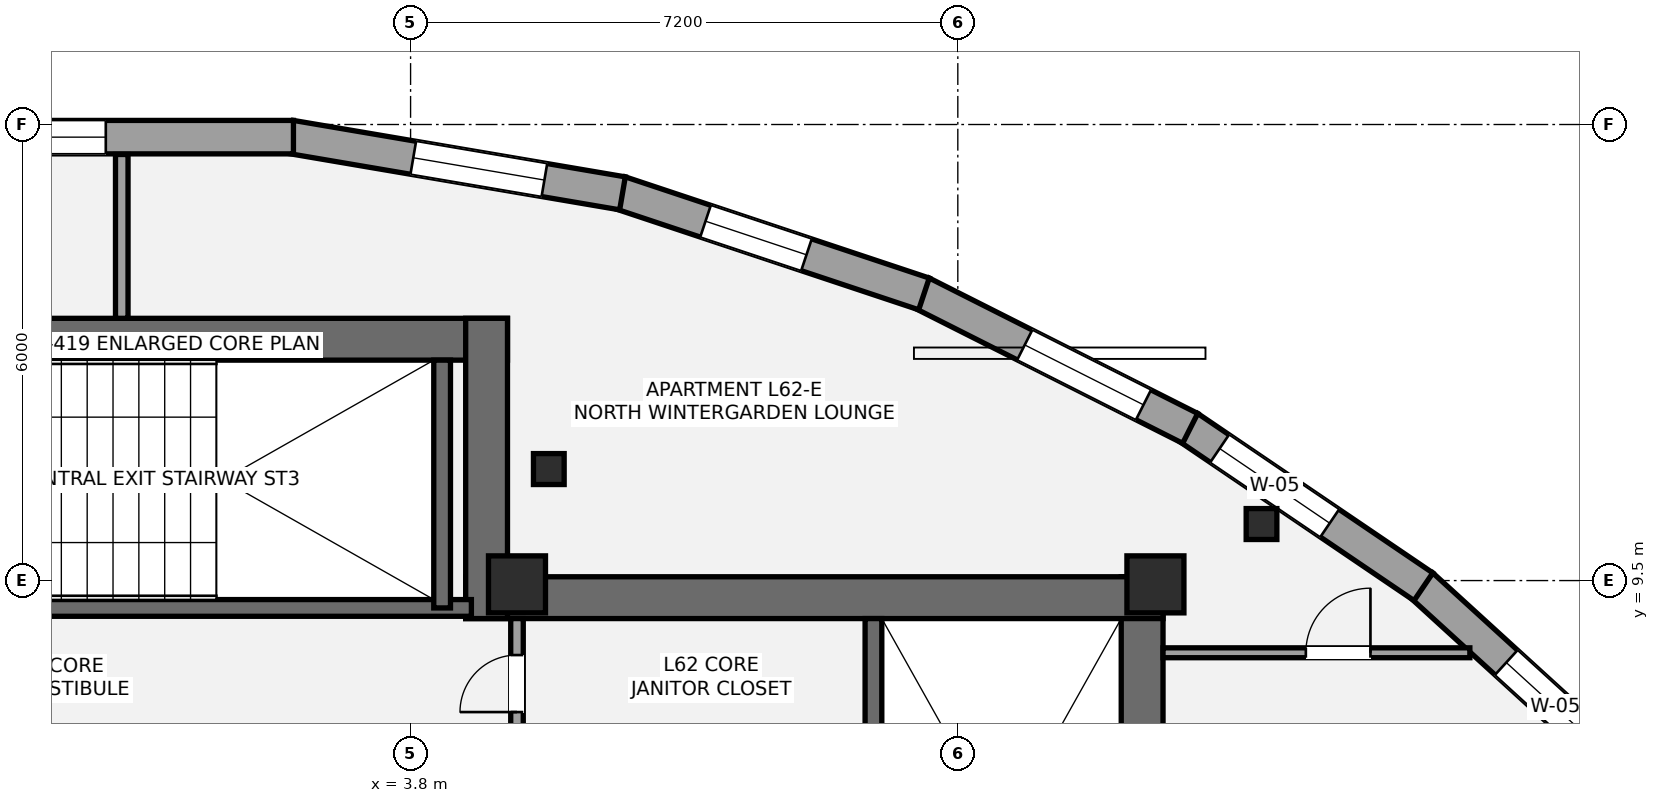
"""IFC4 building model, lengths in metres.
Left out: names, types, materials, properties, quantities, classifications, styles, units other than length and angle.
Written with IfcOpenShell. Run it as: python <this file> out.ifc"""

import sys

from ifc_helpers import new_model, si_unit, direction, frame, frame_2d, origin, origin_2d, place, context, subcontext, project, spatial, rectangle, i_section, extrude, element, fill, save


model = new_model("IFC4")
c1 = context("Model", 3, precision=1e-05, world=origin(), true_north=direction((0.0, 1.0)))
c2 = subcontext(c1, "Body", "Model", "MODEL_VIEW")
j1 = project(units=[si_unit("LENGTHUNIT", "METRE"), si_unit("PLANEANGLEUNIT", "RADIAN")], contexts=[c1])
p1 = place(None, origin())
s1 = spatial("IfcSite", under=j1, at=p1, CompositionType="ELEMENT")
p2 = place(p1, origin())
s2 = spatial("IfcBuilding", under=s1, at=p2, CompositionType="ELEMENT")
p3 = place(p2, frame((0.0, 0.0, 222.6)))
s3 = spatial("IfcBuildingStorey", under=s2, at=p3, CompositionType="ELEMENT", Elevation=222.6)
p4 = place(p3, frame((13.425, 1.3, 0.0), z_axis=(0.0, 0.0, 1.0), x_axis=(0.0, 1.0, 0.0)))
e1 = element("IfcWall", 1, at=p4, inside=s3, PredefinedType="SHEAR", context=c2, shape_type="SweptSolid", body=[
    extrude(rectangle(XDim=8.25, YDim=0.55, at=frame_2d((4.125, 0.0))), origin(), (0.0, 0.0, 1.0), 3.15),
])
p5 = place(p3, frame((4.525, 9.275, 0.0), z_axis=(0.0, 0.0, 1.0), x_axis=(1.0, 0.0, 0.0)))
e2 = element("IfcWall", 2, at=p5, inside=s3, PredefinedType="SHEAR", context=c2, shape_type="SweptSolid", body=[
    extrude(rectangle(XDim=9.175, YDim=0.55, at=frame_2d((4.587, 0.0))), origin(), (0.0, 0.0, 1.0), 3.15),
])
p6 = place(p3, frame((9.89, 1.85, 0.0), z_axis=(0.0, 0.0, 1.0), x_axis=(0.0, 1.0, 0.0)))
e3 = element("IfcWall", 3, at=p6, inside=s3, PredefinedType="SHEAR", context=c2, shape_type="SweptSolid", body=[
    extrude(rectangle(XDim=7.15, YDim=0.22, at=frame_2d((3.575, 0.0))), origin(), (0.0, 0.0, 1.0), 3.15),
])
p7 = place(p3, frame((-5.075, 12.675, 0.0), z_axis=(0.0, 0.0, 1.0), x_axis=(1.0, 0.0, 0.0)))
e4 = element("IfcWall", 4, at=p7, inside=s3, PredefinedType="SHEAR", context=c2, shape_type="SweptSolid", body=[
    extrude(rectangle(XDim=10.15, YDim=0.55, at=frame_2d((5.075, 0.0))), origin(), (0.0, 0.0, 1.0), 3.15),
])
p8 = place(p3, frame((4.8, 9.0, 0.0), z_axis=(0.0, 0.0, 1.0), x_axis=(0.0, 1.0, 0.0)))
e5 = element("IfcWall", 5, at=p8, inside=s3, PredefinedType="SHEAR", context=c2, shape_type="SweptSolid", body=[
    extrude(rectangle(XDim=3.95, YDim=0.55, at=frame_2d((1.975, 0.0))), origin(), (0.0, 0.0, 1.0), 3.15),
])
p9 = place(p3, frame((-4.7, 9.14, 0.0), z_axis=(0.0, 0.0, 1.0), x_axis=(1.0, 0.0, 0.0)))
e6 = element("IfcWall", 6, at=p9, inside=s3, PredefinedType="SHEAR", context=c2, shape_type="SweptSolid", body=[
    extrude(rectangle(XDim=9.3, YDim=0.22, at=frame_2d((4.65, 0.0))), origin(), (0.0, 0.0, 1.0), 3.15),
])
p10 = place(p9, frame((1.15, 0.0, 0.0)))
e7 = element("IfcOpeningElement", 7, at=p10, cuts=e6, PredefinedType="OPENING", context=c2, shape_type="SweptSolid", body=[
    extrude(rectangle(XDim=1.05, YDim=2.15, at=frame_2d((0.525, 1.075))), frame((0.0, 0.12, 0.0), z_axis=(0.0, -1.0, 0.0), x_axis=(1.0, 0.0, 0.0)), (0.0, 0.0, 1.0), 0.24),
])
p11 = place(p3, frame((4.215, 9.14, 0.0), z_axis=(0.0, 0.0, 1.0), x_axis=(0.0, 1.0, 0.0)))
e8 = element("IfcWall", 8, at=p11, inside=s3, PredefinedType="SHEAR", context=c2, shape_type="SweptSolid", body=[
    extrude(rectangle(XDim=3.26, YDim=0.22, at=frame_2d((1.63, 0.0))), origin(), (0.0, 0.0, 1.0), 3.15),
])
for number, where, z_axis, x_axis in (
    (9, (5.2, 9.45, 0.0), (0.0, 0.0, 1.0), (1.0, 0.0, 0.0)),
    (10, (13.6, 9.45, 0.0), (0.0, 0.0, 1.0), (1.0, 0.0, 0.0)),
):
    element("IfcColumn", number, at=place(p3, frame(where, z_axis=z_axis, x_axis=x_axis)), inside=s3, PredefinedType="PILASTER", context=c2, shape_type="SweptSolid", body=[
        extrude(rectangle(XDim=0.75, YDim=0.75, at=origin_2d()), origin(), (0.0, 0.0, 1.0), 3.15),
    ])
for number, where, z_axis, x_axis in (
    (11, (14.996, 10.244, 0.0), (0.0, 0.0, 1.0), (1.0, 0.0, 0.0)),
    (12, (5.619, 10.967, 0.0), (0.0, 0.0, 1.0), (1.0, 0.0, 0.0)),
):
    element("IfcColumn", number, at=place(p3, frame(where, z_axis=z_axis, x_axis=x_axis)), inside=s3, PredefinedType="COLUMN", context=c2, shape_type="SweptSolid", body=[
        extrude(i_section(OverallWidth=0.404, OverallDepth=0.407, WebThickness=0.027, FlangeThickness=0.044, at=origin_2d()), origin(), (0.0, 0.0, 1.0), 3.15),
    ])
p12 = place(p3, frame((17.101, 9.438, 0.0), z_axis=(0.0, 0.0, 1.0), x_axis=(0.738907573949, -0.673806795129, 0.0)))
e13 = element("IfcWall", 13, at=p12, inside=s3, PredefinedType="STANDARD", context=c2, shape_type="SweptSolid", body=[
    extrude(rectangle(XDim=3.555, YDim=0.44, at=frame_2d((1.778, 0.0))), origin(), (0.0, 0.0, 1.0), 2.336),
])
p13 = place(p12, frame((1.508, 0.0, 0.55)))
e14 = element("IfcOpeningElement", 14, at=p13, cuts=e13, PredefinedType="OPENING", context=c2, shape_type="SweptSolid", body=[
    extrude(rectangle(XDim=1.75, YDim=1.55, at=frame_2d((0.875, 0.775))), frame((0.0, 0.23, 0.0), z_axis=(0.0, -1.0, 0.0), x_axis=(1.0, 0.0, 0.0)), (0.0, 0.0, 1.0), 0.46),
])
p14 = place(p3, frame((14.033, 11.516, 0.0), z_axis=(0.0, 0.0, 1.0), x_axis=(0.827642668093, -0.561255391023, 0.0)))
e15 = element("IfcWall", 15, at=p14, inside=s3, PredefinedType="STANDARD", context=c2, shape_type="SweptSolid", body=[
    extrude(rectangle(XDim=3.738, YDim=0.44, at=frame_2d((1.869, 0.0))), origin(), (0.0, 0.0, 1.0), 2.336),
])
p15 = place(p14, frame((0.498, 0.0, 0.55)))
e16 = element("IfcOpeningElement", 16, at=p15, cuts=e15, PredefinedType="OPENING", context=c2, shape_type="SweptSolid", body=[
    extrude(rectangle(XDim=1.75, YDim=1.55, at=frame_2d((0.875, 0.775))), frame((0.0, 0.23, 0.0), z_axis=(0.0, -1.0, 0.0), x_axis=(1.0, 0.0, 0.0)), (0.0, 0.0, 1.0), 0.46),
])
p16 = place(p3, frame((10.525, 13.284, 0.0), z_axis=(0.0, 0.0, 1.0), x_axis=(0.892866610217, -0.450321236851, 0.0)))
e17 = element("IfcWall", 17, at=p16, inside=s3, PredefinedType="STANDARD", context=c2, shape_type="SweptSolid", body=[
    extrude(rectangle(XDim=3.956, YDim=0.44, at=frame_2d((1.978, 0.0))), origin(), (0.0, 0.0, 1.0), 2.336),
])
p17 = place(p16, frame((1.518, 0.0, 0.55)))
e18 = element("IfcOpeningElement", 18, at=p17, cuts=e17, PredefinedType="OPENING", context=c2, shape_type="SweptSolid", body=[
    extrude(rectangle(XDim=1.75, YDim=1.55, at=frame_2d((0.875, 0.775))), frame((0.0, 0.23, 0.0), z_axis=(0.0, -1.0, 0.0), x_axis=(1.0, 0.0, 0.0)), (0.0, 0.0, 1.0), 0.46),
])
p18 = place(p3, frame((6.555, 14.603, 0.0), z_axis=(0.0, 0.0, 1.0), x_axis=(0.948810648135, -0.315845459024, 0.0)))
e19 = element("IfcWall", 19, at=p18, inside=s3, PredefinedType="STANDARD", context=c2, shape_type="SweptSolid", body=[
    extrude(rectangle(XDim=4.215, YDim=0.44, at=frame_2d((2.107, 0.0))), origin(), (0.0, 0.0, 1.0), 2.336),
])
p19 = place(p18, frame((1.186, 0.0, 0.55)))
e20 = element("IfcOpeningElement", 20, at=p19, cuts=e19, PredefinedType="OPENING", context=c2, shape_type="SweptSolid", body=[
    extrude(rectangle(XDim=1.4, YDim=1.55, at=frame_2d((0.7, 0.775))), frame((0.0, 0.23, 0.0), z_axis=(0.0, -1.0, 0.0), x_axis=(1.0, 0.0, 0.0)), (0.0, 0.0, 1.0), 0.46),
])
p20 = place(p3, frame((2.222, 15.337, 0.0), z_axis=(0.0, 0.0, 1.0), x_axis=(0.985849288176, -0.16763406874, 0.0)))
e21 = element("IfcWall", 21, at=p20, inside=s3, PredefinedType="STANDARD", context=c2, shape_type="SweptSolid", body=[
    extrude(rectangle(XDim=4.429, YDim=0.44, at=frame_2d((2.214, 0.0))), origin(), (0.0, 0.0, 1.0), 2.336),
])
p21 = place(p20, frame((1.637, 0.0, 0.55)))
e22 = element("IfcOpeningElement", 22, at=p21, cuts=e21, PredefinedType="OPENING", context=c2, shape_type="SweptSolid", body=[
    extrude(rectangle(XDim=1.75, YDim=1.55, at=frame_2d((0.875, 0.775))), frame((0.0, 0.23, 0.0), z_axis=(0.0, -1.0, 0.0), x_axis=(1.0, 0.0, 0.0)), (0.0, 0.0, 1.0), 0.46),
])
p22 = place(p3, frame((-2.259, 15.334, 0.0), z_axis=(0.0, 0.0, 1.0), x_axis=(1.0, 0.0, 0.0)))
e23 = element("IfcWall", 23, at=p22, inside=s3, PredefinedType="STANDARD", context=c2, shape_type="SweptSolid", body=[
    extrude(rectangle(XDim=4.518, YDim=0.44, at=frame_2d((2.259, 0.0))), origin(), (0.0, 0.0, 1.0), 2.336),
])
p23 = place(p22, frame((0.299, 0.0, 0.55)))
e24 = element("IfcOpeningElement", 24, at=p23, cuts=e23, PredefinedType="OPENING", context=c2, shape_type="SweptSolid", body=[
    extrude(rectangle(XDim=1.75, YDim=1.55, at=frame_2d((0.875, 0.775))), frame((0.0, 0.23, 0.0), z_axis=(0.0, -1.0, 0.0), x_axis=(1.0, 0.0, 0.0)), (0.0, 0.0, 1.0), 0.46),
])
p24 = place(p3, frame((5.2, 7.42, 0.0), z_axis=(0.0, 0.0, 1.0), x_axis=(0.0, 1.0, 0.0)))
e25 = element("IfcWall", 25, at=p24, inside=s3, PredefinedType="PARTITIONING", context=c2, shape_type="SweptSolid", body=[
    extrude(rectangle(XDim=1.58, YDim=0.165, at=frame_2d((0.79, 0.0))), origin(), (0.0, 0.0, 1.0), 2.97),
])
p25 = place(p24, frame((0.35, 0.0, 0.0)))
e26 = element("IfcOpeningElement", 26, at=p25, cuts=e25, PredefinedType="OPENING", context=c2, shape_type="SweptSolid", body=[
    extrude(rectangle(XDim=0.75, YDim=2.1, at=frame_2d((0.375, 1.05))), frame((0.0, 0.093, 0.0), z_axis=(0.0, -1.0, 0.0), x_axis=(1.0, 0.0, 0.0)), (0.0, 0.0, 1.0), 0.185),
])
p26 = place(p3, frame((0.0, 12.95, 0.0), z_axis=(0.0, 0.0, 1.0), x_axis=(0.0, 1.0, 0.0)))
e27 = element("IfcWall", 27, at=p26, inside=s3, PredefinedType="PARTITIONING", context=c2, shape_type="SweptSolid", body=[
    extrude(rectangle(XDim=2.156, YDim=0.165, at=frame_2d((1.078, 0.0))), origin(), (0.0, 0.0, 1.0), 2.97),
])
p27 = place(p3, frame((13.7, 8.55, 0.0), z_axis=(0.0, 0.0, 1.0), x_axis=(1.0, 0.0, 0.0)))
e28 = element("IfcWall", 28, at=p27, inside=s3, PredefinedType="PARTITIONING", context=c2, shape_type="SweptSolid", body=[
    extrude(rectangle(XDim=4.037, YDim=0.13, at=frame_2d((2.019, 0.0))), origin(), (0.0, 0.0, 1.0), 2.423),
])
p28 = place(p27, frame((1.879, 0.0, 0.0)))
e29 = element("IfcOpeningElement", 29, at=p28, cuts=e28, PredefinedType="OPENING", context=c2, shape_type="SweptSolid", body=[
    extrude(rectangle(XDim=0.85, YDim=2.1, at=frame_2d((0.425, 1.05))), frame((0.0, 0.075, 0.0), z_axis=(0.0, -1.0, 0.0), x_axis=(1.0, 0.0, 0.0)), (0.0, 0.0, 1.0), 0.15),
])
p29 = place(p13, origin())
e30 = element("IfcWindow", 30, at=p29, inside=s3, PartitioningType="SINGLE_PANEL", PredefinedType="WINDOW", context=c2, shape_type="SweptSolid", body=[
    extrude(rectangle(XDim=1.75, YDim=1.55, at=frame_2d((0.875, 0.775))), frame((0.0, -0.01, 0.0), z_axis=(0.0, -1.0, 0.0), x_axis=(1.0, 0.0, 0.0)), (0.0, 0.0, 1.0), 0.06),
])
fill(e14, e30)
p30 = place(p15, origin())
e31 = element("IfcWindow", 31, at=p30, inside=s3, PartitioningType="SINGLE_PANEL", PredefinedType="WINDOW", context=c2, shape_type="SweptSolid", body=[
    extrude(rectangle(XDim=1.75, YDim=1.55, at=frame_2d((0.875, 0.775))), frame((0.0, -0.01, 0.0), z_axis=(0.0, -1.0, 0.0), x_axis=(1.0, 0.0, 0.0)), (0.0, 0.0, 1.0), 0.06),
])
fill(e16, e31)
p31 = place(p17, origin())
e32 = element("IfcWindow", 32, at=p31, inside=s3, PartitioningType="SINGLE_PANEL", PredefinedType="WINDOW", context=c2, shape_type="SweptSolid", body=[
    extrude(rectangle(XDim=1.75, YDim=1.55, at=frame_2d((0.875, 0.775))), frame((0.0, -0.01, 0.0), z_axis=(0.0, -1.0, 0.0), x_axis=(1.0, 0.0, 0.0)), (0.0, 0.0, 1.0), 0.06),
])
fill(e18, e32)
p32 = place(p19, origin())
e33 = element("IfcWindow", 33, at=p32, inside=s3, PartitioningType="SINGLE_PANEL", PredefinedType="WINDOW", context=c2, shape_type="SweptSolid", body=[
    extrude(rectangle(XDim=1.4, YDim=1.55, at=frame_2d((0.7, 0.775))), frame((0.0, -0.01, 0.0), z_axis=(0.0, -1.0, 0.0), x_axis=(1.0, 0.0, 0.0)), (0.0, 0.0, 1.0), 0.06),
])
fill(e20, e33)
p33 = place(p21, origin())
e34 = element("IfcWindow", 34, at=p33, inside=s3, PartitioningType="SINGLE_PANEL", PredefinedType="WINDOW", context=c2, shape_type="SweptSolid", body=[
    extrude(rectangle(XDim=1.75, YDim=1.55, at=frame_2d((0.875, 0.775))), frame((0.0, -0.01, 0.0), z_axis=(0.0, -1.0, 0.0), x_axis=(1.0, 0.0, 0.0)), (0.0, 0.0, 1.0), 0.06),
])
fill(e22, e34)
p34 = place(p23, origin())
e35 = element("IfcWindow", 35, at=p34, inside=s3, PartitioningType="SINGLE_PANEL", PredefinedType="WINDOW", context=c2, shape_type="SweptSolid", body=[
    extrude(rectangle(XDim=1.75, YDim=1.55, at=frame_2d((0.875, 0.775))), frame((0.0, -0.01, 0.0), z_axis=(0.0, -1.0, 0.0), x_axis=(1.0, 0.0, 0.0)), (0.0, 0.0, 1.0), 0.06),
])
fill(e24, e35)
p35 = place(p25, origin())
e36 = element("IfcDoor", 36, at=p35, inside=s3, OperationType="SINGLE_SWING_LEFT", PredefinedType="DOOR", context=c2, shape_type="SweptSolid", body=[
    extrude(rectangle(XDim=0.75, YDim=2.1, at=frame_2d((0.375, 1.05))), frame((0.0, 0.025, 0.0), z_axis=(0.0, -1.0, 0.0), x_axis=(1.0, 0.0, 0.0)), (0.0, 0.0, 1.0), 0.05),
])
fill(e26, e36)
p36 = place(p28, origin())
e37 = element("IfcDoor", 37, at=p36, inside=s3, OperationType="SINGLE_SWING_RIGHT", PredefinedType="DOOR", context=c2, shape_type="SweptSolid", body=[
    extrude(rectangle(XDim=0.85, YDim=2.1, at=frame_2d((0.425, 1.05))), frame((0.0, 0.025, 0.0), z_axis=(0.0, -1.0, 0.0), x_axis=(1.0, 0.0, 0.0)), (0.0, 0.0, 1.0), 0.05),
])
fill(e29, e37)
save(model, sys.argv[1])
